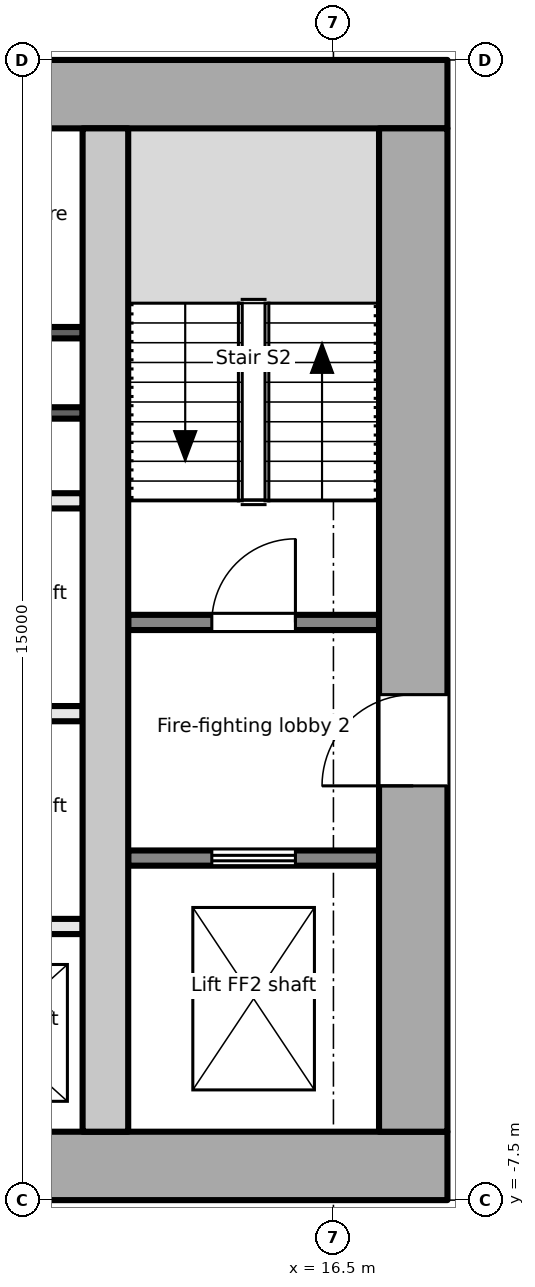
"""IFC4 building model, lengths in metres.
Left out: names, types, materials, properties, quantities, classifications, styles, units other than length and angle.
Written with IfcOpenShell. Run it as: python <this file> out.ifc"""

import sys

from ifc_helpers import new_model, si_unit, direction, frame, frame_2d, origin, place, context, subcontext, project, spatial, rectangle, extrude, element, fill, save


model = new_model("IFC4")
c1 = context("Model", 3, precision=1e-05, world=origin(), true_north=direction((0.0, 1.0)))
c2 = subcontext(c1, "Body", "Model", "MODEL_VIEW")
j1 = project(units=[si_unit("LENGTHUNIT", "METRE"), si_unit("PLANEANGLEUNIT", "RADIAN")], contexts=[c1])
p1 = place(None, origin())
s1 = spatial("IfcSite", under=j1, at=p1, CompositionType="ELEMENT")
p2 = place(p1, origin())
s2 = spatial("IfcBuilding", under=s1, at=p2, CompositionType="ELEMENT")
p3 = place(p2, frame((0.0, 0.0, 48.8)))
s3 = spatial("IfcBuildingStorey", under=s2, at=p3, CompositionType="ELEMENT", Elevation=48.8)
p4 = place(p3, frame((-18.0, -7.05, -0.2), z_axis=(0.0, 0.0, 1.0), x_axis=(1.0, 0.0, 0.0)))
e1 = element("IfcWall", 1, at=p4, inside=s3, PredefinedType="SHEAR", context=c2, shape_type="SweptSolid", body=[
    extrude(rectangle(XDim=36.0, YDim=0.9, at=frame_2d((18.0, 0.0))), origin(), (0.0, 0.0, 1.0), 4.1),
])
p5 = place(p4, frame((7.8, 0.0, 0.2)))
e2 = element("IfcOpeningElement", 2, at=p5, cuts=e1, PredefinedType="OPENING", context=c2, shape_type="SweptSolid", body=[
    extrude(rectangle(XDim=2.4, YDim=2.1, at=frame_2d((1.2, 1.05))), frame((0.0, 0.46, 0.0), z_axis=(0.0, -1.0, 0.0), x_axis=(1.0, 0.0, 0.0)), (0.0, 0.0, 1.0), 0.921),
])
p6 = place(p4, frame((17.4, 0.0, 0.2)))
e3 = element("IfcOpeningElement", 3, at=p6, cuts=e1, PredefinedType="OPENING", context=c2, shape_type="SweptSolid", body=[
    extrude(rectangle(XDim=1.2, YDim=2.1, at=frame_2d((0.6, 1.05))), frame((0.0, 0.46, 0.0), z_axis=(0.0, -1.0, 0.0), x_axis=(1.0, 0.0, 0.0)), (0.0, 0.0, 1.0), 0.921),
])
p7 = place(p4, frame((26.1, 0.0, 0.2)))
e4 = element("IfcOpeningElement", 4, at=p7, cuts=e1, PredefinedType="OPENING", context=c2, shape_type="SweptSolid", body=[
    extrude(rectangle(XDim=2.4, YDim=2.1, at=frame_2d((1.2, 1.05))), frame((0.0, 0.46, 0.0), z_axis=(0.0, -1.0, 0.0), x_axis=(1.0, 0.0, 0.0)), (0.0, 0.0, 1.0), 0.921),
])
p8 = place(p3, frame((-18.0, 7.05, -0.2), z_axis=(0.0, 0.0, 1.0), x_axis=(1.0, 0.0, 0.0)))
e5 = element("IfcWall", 5, at=p8, inside=s3, PredefinedType="SHEAR", context=c2, shape_type="SweptSolid", body=[
    extrude(rectangle(XDim=36.0, YDim=0.9, at=frame_2d((18.0, 0.0))), origin(), (0.0, 0.0, 1.0), 4.1),
])
p9 = place(p3, frame((17.55, -6.6, -0.2), z_axis=(0.0, 0.0, 1.0), x_axis=(0.0, 1.0, 0.0)))
e6 = element("IfcWall", 6, at=p9, inside=s3, PredefinedType="SHEAR", context=c2, shape_type="SweptSolid", body=[
    extrude(rectangle(XDim=13.2, YDim=0.9, at=frame_2d((6.6, 0.0))), origin(), (0.0, 0.0, 1.0), 4.1),
])
p10 = place(p9, frame((4.55, 0.0, 0.2)))
e7 = element("IfcOpeningElement", 7, at=p10, cuts=e6, PredefinedType="OPENING", context=c2, shape_type="SweptSolid", body=[
    extrude(rectangle(XDim=1.2, YDim=2.1, at=frame_2d((0.6, 1.05))), frame((0.0, 0.46, 0.0), z_axis=(0.0, -1.0, 0.0), x_axis=(1.0, 0.0, 0.0)), (0.0, 0.0, 1.0), 0.921),
])
p11 = place(p3, frame((13.5, -6.6, -0.2), z_axis=(0.0, 0.0, 1.0), x_axis=(0.0, 1.0, 0.0)))
e8 = element("IfcWall", 8, at=p11, inside=s3, PredefinedType="SHEAR", context=c2, shape_type="SweptSolid", body=[
    extrude(rectangle(XDim=13.2, YDim=0.6, at=frame_2d((6.6, 0.0))), origin(), (0.0, 0.0, 1.0), 4.1),
])
p12 = place(p3, frame((13.8, -3.0, 0.0), z_axis=(0.0, 0.0, 1.0), x_axis=(1.0, 0.0, 0.0)))
e9 = element("IfcWall", 9, at=p12, inside=s3, PredefinedType="PARTITIONING", context=c2, shape_type="SweptSolid", body=[
    extrude(rectangle(XDim=3.3, YDim=0.2, at=frame_2d((1.65, 0.0))), origin(), (0.0, 0.0, 1.0), 3.9),
])
p13 = place(p12, frame((1.1, 0.0, 0.0)))
e10 = element("IfcOpeningElement", 10, at=p13, cuts=e9, PredefinedType="OPENING", context=c2, shape_type="SweptSolid", body=[
    extrude(rectangle(XDim=1.1, YDim=2.1, at=frame_2d((0.55, 1.05))), frame((0.0, 0.111, 0.0), z_axis=(0.0, -1.0, 0.0), x_axis=(1.0, 0.0, 0.0)), (0.0, 0.0, 1.0), 0.221),
])
p14 = place(p3, frame((13.8, 0.1, 0.0), z_axis=(0.0, 0.0, 1.0), x_axis=(1.0, 0.0, 0.0)))
e11 = element("IfcWall", 11, at=p14, inside=s3, PredefinedType="PARTITIONING", context=c2, shape_type="SweptSolid", body=[
    extrude(rectangle(XDim=3.3, YDim=0.2, at=frame_2d((1.65, 0.0))), origin(), (0.0, 0.0, 1.0), 3.9),
])
p15 = place(p14, frame((1.1, 0.0, 0.0)))
e12 = element("IfcOpeningElement", 12, at=p15, cuts=e11, PredefinedType="OPENING", context=c2, shape_type="SweptSolid", body=[
    extrude(rectangle(XDim=1.1, YDim=2.1, at=frame_2d((0.55, 1.05))), frame((0.0, 0.111, 0.0), z_axis=(0.0, -1.0, 0.0), x_axis=(1.0, 0.0, 0.0)), (0.0, 0.0, 1.0), 0.221),
])
for number, where, z_axis, x_axis in (
    (13, (10.9, -3.9, 0.0), (0.0, 0.0, 1.0), (1.0, 0.0, 0.0)),
    (14, (10.9, -1.1, 0.0), (0.0, 0.0, 1.0), (1.0, 0.0, 0.0)),
    (15, (10.9, 1.7, 0.0), (0.0, 0.0, 1.0), (1.0, 0.0, 0.0)),
):
    element("IfcWall", number, at=place(p3, frame(where, z_axis=z_axis, x_axis=x_axis)), inside=s3, PredefinedType="PARTITIONING", context=c2, shape_type="SweptSolid", body=[
        extrude(rectangle(XDim=2.3, YDim=0.2, at=frame_2d((1.15, 0.0))), origin(), (0.0, 0.0, 1.0), 3.9),
    ])
for number, where, z_axis, x_axis in (
    (16, (10.9, 2.856, 0.0), (0.0, 0.0, 1.0), (1.0, 0.0, 0.0)),
    (17, (10.9, 3.912, 0.0), (0.0, 0.0, 1.0), (1.0, 0.0, 0.0)),
):
    element("IfcWall", number, at=place(p3, frame(where, z_axis=z_axis, x_axis=x_axis)), inside=s3, PredefinedType="PARTITIONING", context=c2, shape_type="SweptSolid", body=[
        extrude(rectangle(XDim=2.3, YDim=0.15, at=frame_2d((1.15, 0.0))), origin(), (0.0, 0.0, 1.0), 3.9),
    ])
p16 = place(p13, origin())
e18 = element("IfcDoor", 18, at=p16, inside=s3, OperationType="DOUBLE_DOOR_SLIDING", PredefinedType="DOOR", context=c2, shape_type="SweptSolid", body=[
    extrude(rectangle(XDim=1.1, YDim=2.1, at=frame_2d((0.55, 1.05))), frame((0.0, 0.025, 0.0), z_axis=(0.0, -1.0, 0.0), x_axis=(1.0, 0.0, 0.0)), (0.0, 0.0, 1.0), 0.05),
])
fill(e10, e18)
p17 = place(p10, origin())
e19 = element("IfcDoor", 19, at=p17, inside=s3, OperationType="SINGLE_SWING_LEFT", PredefinedType="DOOR", context=c2, shape_type="SweptSolid", body=[
    extrude(rectangle(XDim=1.2, YDim=2.1, at=frame_2d((0.6, 1.05))), frame((0.0, 0.025, 0.0), z_axis=(0.0, -1.0, 0.0), x_axis=(1.0, 0.0, 0.0)), (0.0, 0.0, 1.0), 0.05),
])
fill(e7, e19)
p18 = place(p15, origin())
e20 = element("IfcDoor", 20, at=p18, inside=s3, OperationType="SINGLE_SWING_RIGHT", PredefinedType="DOOR", context=c2, shape_type="SweptSolid", body=[
    extrude(rectangle(XDim=1.1, YDim=2.1, at=frame_2d((0.55, 1.05))), frame((0.0, 0.025, 0.0), z_axis=(0.0, -1.0, 0.0), x_axis=(1.0, 0.0, 0.0)), (0.0, 0.0, 1.0), 0.05),
])
fill(e12, e20)
save(model, sys.argv[1])
